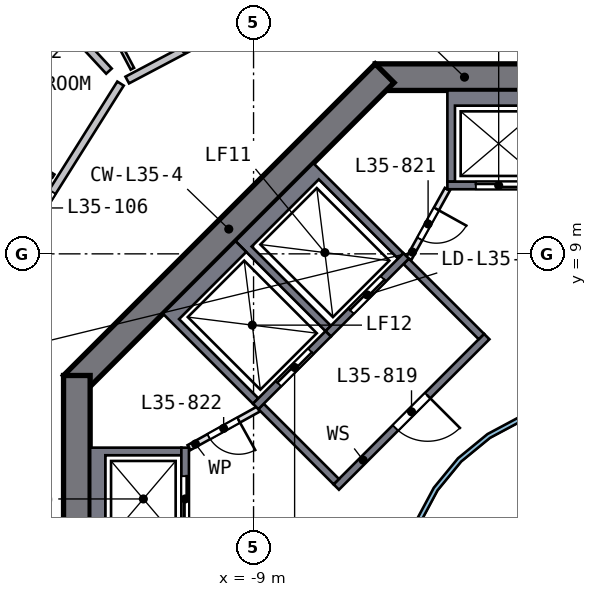
"""IFC4 building model, lengths in metres.
Left out: names, types, materials, properties, quantities, classifications, styles, units other than length and angle.
Written with IfcOpenShell. Run it as: python <this file> out.ifc"""

import sys

from ifc_helpers import new_model, si_unit, direction, frame, frame_2d, origin, place, context, subcontext, project, spatial, polyline, rectangle, outline, extrude, element, fill, save


model = new_model("IFC4")
c1 = context("Model", 3, precision=1e-05, world=origin(), true_north=direction((0.0, 1.0)))
c2 = subcontext(c1, "Body", "Model", "MODEL_VIEW")
j1 = project(units=[si_unit("LENGTHUNIT", "METRE"), si_unit("PLANEANGLEUNIT", "RADIAN")], contexts=[c1])
p1 = place(None, origin())
s1 = spatial("IfcSite", under=j1, at=p1, CompositionType="ELEMENT")
p2 = place(p1, origin())
s2 = spatial("IfcBuilding", under=s1, at=p2, CompositionType="ELEMENT")
p3 = place(p2, frame((0.0, 0.0, 147.0)))
s3 = spatial("IfcBuildingStorey", under=s2, at=p3, CompositionType="ELEMENT", Elevation=147.0)
p4 = place(p3, frame((5.799, 13.65, 0.0), z_axis=(0.0, 0.0, 1.0), x_axis=(-1.0, 0.0, 0.0)))
e1 = element("IfcWall", 1, at=p4, inside=s3, PredefinedType="SHEAR", context=c2, shape_type="SweptSolid", body=[
    extrude(rectangle(XDim=11.598, YDim=0.7, at=frame_2d((5.799, 0.0))), origin(), (0.0, 0.0, 1.0), 3.5),
])
p5 = place(p4, frame((4.899, 0.0, 0.0)))
e2 = element("IfcOpeningElement", 2, at=p5, cuts=e1, PredefinedType="OPENING", context=c2, shape_type="SweptSolid", body=[
    extrude(rectangle(XDim=1.8, YDim=2.1, at=frame_2d((0.9, 1.05))), frame((0.0, 0.36, 0.0), z_axis=(0.0, -1.0, 0.0), x_axis=(1.0, 0.0, 0.0)), (0.0, 0.0, 1.0), 0.72),
])
p6 = place(p3, frame((-5.552, 13.752, 0.0), z_axis=(0.0, 0.0, 1.0), x_axis=(-0.707106781, -0.707106781, 0.0)))
e3 = element("IfcWall", 3, at=p6, inside=s3, PredefinedType="SHEAR", context=c2, shape_type="SweptSolid", body=[
    extrude(rectangle(XDim=11.598, YDim=0.7, at=frame_2d((5.799, 0.0))), origin(), (0.0, 0.0, 1.0), 3.5),
])
p7 = place(p3, frame((-13.65, 5.799, 0.0), z_axis=(0.0, 0.0, 1.0), x_axis=(0.0, -1.0, 0.0)))
e4 = element("IfcWall", 4, at=p7, inside=s3, PredefinedType="SHEAR", context=c2, shape_type="SweptSolid", body=[
    extrude(rectangle(XDim=11.598, YDim=0.7, at=frame_2d((5.799, 0.0))), origin(), (0.0, 0.0, 1.0), 3.5),
])
p8 = place(p7, frame((4.899, 0.0, 0.0)))
e5 = element("IfcOpeningElement", 5, at=p8, cuts=e4, PredefinedType="OPENING", context=c2, shape_type="SweptSolid", body=[
    extrude(rectangle(XDim=1.8, YDim=2.1, at=frame_2d((0.9, 1.05))), frame((0.0, 0.36, 0.0), z_axis=(0.0, -1.0, 0.0), x_axis=(1.0, 0.0, 0.0)), (0.0, 0.0, 1.0), 0.72),
])
p9 = place(p3, origin())
e6 = element("IfcWall", 6, at=p9, inside=s3, PredefinedType="SOLIDWALL", context=c2, shape_type="SweptSolid", body=[
    extrude(outline(polyline([(-3.9, 10.9), (-3.9, 13.3), (-1.2, 13.3), (-1.2, 10.9), (-1.4, 10.9), (-1.4, 12.9), (-3.7, 12.9), (-3.7, 10.9), (-3.9, 10.9)])), origin(), (0.0, 0.0, 1.0), 3.19),
])
p10 = place(p3, frame((-1.2, 10.8, 0.0), z_axis=(0.0, 0.0, 1.0), x_axis=(-1.0, 0.0, 0.0)))
e7 = element("IfcWall", 7, at=p10, inside=s3, PredefinedType="SOLIDWALL", context=c2, shape_type="SweptSolid", body=[
    extrude(rectangle(XDim=2.7, YDim=0.2, at=frame_2d((1.35, 0.0))), origin(), (0.0, 0.0, 1.0), 3.19),
])
p11 = place(p10, frame((0.75, 0.0, 0.0)))
e8 = element("IfcOpeningElement", 8, at=p11, cuts=e7, PredefinedType="OPENING", context=c2, shape_type="SweptSolid", body=[
    extrude(rectangle(XDim=1.2, YDim=2.1, at=frame_2d((0.6, 1.05))), frame((0.0, 0.11, 0.0), z_axis=(0.0, -1.0, 0.0), x_axis=(1.0, 0.0, 0.0)), (0.0, 0.0, 1.0), 0.22),
])
p12 = place(p3, origin())
e9 = element("IfcWall", 9, at=p12, inside=s3, PredefinedType="SOLIDWALL", context=c2, shape_type="SweptSolid", body=[
    extrude(outline(polyline([(-13.3, 3.9), (-10.9, 3.9), (-10.9, 3.7), (-12.9, 3.7), (-12.9, 1.4), (-10.9, 1.4), (-10.9, 1.2), (-13.3, 1.2), (-13.3, 3.9)])), origin(), (0.0, 0.0, 1.0), 3.19),
])
p13 = place(p3, frame((-10.8, 1.2, 0.0), z_axis=(0.0, 0.0, 1.0), x_axis=(0.0, 1.0, 0.0)))
e10 = element("IfcWall", 10, at=p13, inside=s3, PredefinedType="SOLIDWALL", context=c2, shape_type="SweptSolid", body=[
    extrude(rectangle(XDim=2.7, YDim=0.2, at=frame_2d((1.35, 0.0))), origin(), (0.0, 0.0, 1.0), 3.19),
])
p14 = place(p13, frame((0.75, 0.0, 0.0)))
e11 = element("IfcOpeningElement", 11, at=p14, cuts=e10, PredefinedType="OPENING", context=c2, shape_type="SweptSolid", body=[
    extrude(rectangle(XDim=1.2, YDim=2.1, at=frame_2d((0.6, 1.05))), frame((0.0, 0.11, 0.0), z_axis=(0.0, -1.0, 0.0), x_axis=(1.0, 0.0, 0.0)), (0.0, 0.0, 1.0), 0.22),
])
p15 = place(p3, origin())
e12 = element("IfcWall", 12, at=p15, inside=s3, PredefinedType="SOLIDWALL", context=c2, shape_type="SweptSolid", body=[
    extrude(outline(polyline([(-9.475, 9.334), (-7.425, 11.385), (-5.056, 9.016), (-5.197, 8.874), (-7.283, 10.96), (-9.051, 9.192), (-6.965, 7.106), (-7.106, 6.965), (-9.475, 9.334)])), origin(), (0.0, 0.0, 1.0), 3.19),
])
p16 = place(p3, frame((-4.985, 8.945, 0.0), z_axis=(0.0, 0.0, 1.0), x_axis=(-0.707106781, -0.707106781, 0.0)))
e13 = element("IfcWall", 13, at=p16, inside=s3, PredefinedType="SOLIDWALL", context=c2, shape_type="SweptSolid", body=[
    extrude(rectangle(XDim=2.9, YDim=0.2, at=frame_2d((1.45, 0.0))), origin(), (0.0, 0.0, 1.0), 3.19),
])
p17 = place(p16, frame((0.85, 0.0, 0.0)))
e14 = element("IfcOpeningElement", 14, at=p17, cuts=e13, PredefinedType="OPENING", context=c2, shape_type="SweptSolid", body=[
    extrude(rectangle(XDim=1.2, YDim=2.1, at=frame_2d((0.6, 1.05))), frame((0.0, 0.11, 0.0), z_axis=(0.0, -1.0, 0.0), x_axis=(1.0, 0.0, 0.0)), (0.0, 0.0, 1.0), 0.22),
])
p18 = place(p3, origin())
e15 = element("IfcWall", 15, at=p18, inside=s3, PredefinedType="SOLIDWALL", context=c2, shape_type="SweptSolid", body=[
    extrude(outline(polyline([(-11.385, 7.425), (-9.475, 9.334), (-9.192, 9.051), (-10.96, 7.283), (-8.874, 5.197), (-9.016, 5.056), (-11.385, 7.425)])), origin(), (0.0, 0.0, 1.0), 3.19),
])
p19 = place(p3, frame((-7.036, 6.894, 0.0), z_axis=(0.0, 0.0, 1.0), x_axis=(-0.707106781, -0.707106781, 0.0)))
e16 = element("IfcWall", 16, at=p19, inside=s3, PredefinedType="SOLIDWALL", context=c2, shape_type="SweptSolid", body=[
    extrude(rectangle(XDim=2.7, YDim=0.2, at=frame_2d((1.35, 0.0))), origin(), (0.0, 0.0, 1.0), 3.19),
])
p20 = place(p19, frame((0.65, 0.0, 0.0)))
e17 = element("IfcOpeningElement", 17, at=p20, cuts=e16, PredefinedType="OPENING", context=c2, shape_type="SweptSolid", body=[
    extrude(rectangle(XDim=1.2, YDim=2.1, at=frame_2d((0.6, 1.05))), frame((0.0, 0.11, 0.0), z_axis=(0.0, -1.0, 0.0), x_axis=(1.0, 0.0, 0.0)), (0.0, 0.0, 1.0), 0.22),
])
p21 = place(p3, frame((-2.864, 6.823, 0.0), z_axis=(0.0, 0.0, 1.0), x_axis=(-0.707106781, -0.707106781, 0.0)))
e18 = element("IfcWall", 18, at=p21, inside=s3, PredefinedType="SOLIDWALL", context=c2, shape_type="SweptSolid", body=[
    extrude(rectangle(XDim=5.6, YDim=0.2, at=frame_2d((2.8, 0.0))), origin(), (0.0, 0.0, 1.0), 3.19),
])
p22 = place(p21, frame((2.2, 0.0, 0.0)))
e19 = element("IfcOpeningElement", 19, at=p22, cuts=e18, PredefinedType="OPENING", context=c2, shape_type="SweptSolid", body=[
    extrude(rectangle(XDim=1.2, YDim=2.1, at=frame_2d((0.6, 1.05))), frame((0.0, 0.11, 0.0), z_axis=(0.0, -1.0, 0.0), x_axis=(1.0, 0.0, 0.0)), (0.0, 0.0, 1.0), 0.22),
])
for number, where, z_axis, x_axis in (
    (20, (-3.005, 6.823, 0.0), (0.0, 0.0, 1.0), (-0.707, 0.707, 0.0)),
    (21, (-6.823, 3.005, 0.0), (0.0, 0.0, 1.0), (-0.707, 0.707, 0.0)),
):
    element("IfcWall", number, at=place(p3, frame(where, z_axis=z_axis, x_axis=x_axis)), inside=s3, PredefinedType="SOLIDWALL", context=c2, shape_type="SweptSolid", body=[
        extrude(rectangle(XDim=2.8, YDim=0.2, at=frame_2d((1.4, 0.0))), origin(), (0.0, 0.0, 1.0), 3.19),
    ])
p23 = place(p3, frame((-3.9, 10.7, 0.0), z_axis=(0.0, 0.0, 1.0), x_axis=(-0.485692555, -0.874129705, 0.0)))
e22 = element("IfcWall", 22, at=p23, inside=s3, PredefinedType="PARTITIONING", context=c2, shape_type="SweptSolid", body=[
    extrude(rectangle(XDim=2.089, YDim=0.15, at=frame_2d((1.044, 0.0))), origin(), (0.0, 0.0, 1.0), 3.19),
])
p24 = place(p23, frame((0.594, 0.0, 0.0)))
e23 = element("IfcOpeningElement", 23, at=p24, cuts=e22, PredefinedType="OPENING", context=c2, shape_type="SweptSolid", body=[
    extrude(rectangle(XDim=0.9, YDim=2.1, at=frame_2d((0.45, 1.05))), frame((0.0, 0.085, 0.0), z_axis=(0.0, -1.0, 0.0), x_axis=(1.0, 0.0, 0.0)), (0.0, 0.0, 1.0), 0.17),
])
p25 = place(p3, frame((-8.874, 4.914, 0.0), z_axis=(0.0, 0.0, 1.0), x_axis=(-0.874129705, -0.485692555, 0.0)))
e24 = element("IfcWall", 24, at=p25, inside=s3, PredefinedType="PARTITIONING", context=c2, shape_type="SweptSolid", body=[
    extrude(rectangle(XDim=2.089, YDim=0.15, at=frame_2d((1.044, 0.0))), origin(), (0.0, 0.0, 1.0), 3.19),
])
p26 = place(p25, frame((0.594, 0.0, 0.0)))
e25 = element("IfcOpeningElement", 25, at=p26, cuts=e24, PredefinedType="OPENING", context=c2, shape_type="SweptSolid", body=[
    extrude(rectangle(XDim=0.9, YDim=2.1, at=frame_2d((0.45, 1.05))), frame((0.0, 0.085, 0.0), z_axis=(0.0, -1.0, 0.0), x_axis=(1.0, 0.0, 0.0)), (0.0, 0.0, 1.0), 0.17),
])
p27 = place(p3, origin())
e26 = element("IfcWall", 26, at=p27, inside=s3, PredefinedType="SOLIDWALL", context=c2, shape_type="SweptSolid", body=[
    extrude(outline(polyline([(5.021, -0.999), (4.73, -1.959), (4.257, -2.844), (3.62, -3.62), (2.844, -4.257), (1.959, -4.73), (0.999, -5.021), (0.0, -5.12), (-0.999, -5.021), (-1.959, -4.73), (-2.844, -4.257), (-3.62, -3.62), (-4.257, -2.844), (-4.73, -1.959), (-5.021, -0.999), (-5.12, 0.0), (-5.021, 0.999), (-4.73, 1.959), (-4.257, 2.844), (-3.62, 3.62), (-2.844, 4.257), (-1.959, 4.73), (-0.999, 5.021), (0.0, 5.12), (0.999, 5.021), (1.959, 4.73), (2.844, 4.257), (3.62, 3.62), (4.257, 2.844), (4.73, 1.959), (5.021, 0.999), (5.12, 0.0), (5.021, -0.999)]), holes=[polyline([(4.904, 0.976), (4.619, 1.913), (4.157, 2.778), (3.535, 3.535), (2.778, 4.157), (1.913, 4.619), (0.976, 4.904), (0.0, 5.0), (-0.976, 4.904), (-1.913, 4.619), (-2.778, 4.157), (-3.535, 3.535), (-4.157, 2.778), (-4.619, 1.913), (-4.904, 0.976), (-5.0, 0.0), (-4.904, -0.976), (-4.619, -1.913), (-4.157, -2.778), (-3.535, -3.535), (-2.778, -4.157), (-1.913, -4.619), (-0.976, -4.904), (0.0, -5.0), (0.976, -4.904), (1.913, -4.619), (2.778, -4.157), (3.535, -3.535), (4.157, -2.778), (4.619, -1.913), (4.904, -0.976), (5.0, 0.0), (4.904, 0.976)])]), origin(), (0.0, 0.0, 1.0), 3.19),
])
p28 = place(p3, frame((-17.566, 5.425, 0.0), z_axis=(0.0, 0.0, 1.0), x_axis=(0.532300792, 0.846555294, 0.0)))
e27 = element("IfcWall", 27, at=p28, inside=s3, PredefinedType="SOLIDWALL", context=c2, shape_type="SweptSolid", body=[
    extrude(rectangle(XDim=9.516, YDim=0.2, at=frame_2d((4.758, 0.0))), origin(), (0.0, 0.0, 1.0), 3.19),
])
p29 = place(p28, frame((5.15, 0.0, 0.0)))
e28 = element("IfcOpeningElement", 28, at=p29, cuts=e27, PredefinedType="OPENING", context=c2, shape_type="SweptSolid", body=[
    extrude(rectangle(XDim=1.0, YDim=2.1, at=frame_2d((0.5, 1.05))), frame((0.0, 0.11, 0.0), z_axis=(0.0, -1.0, 0.0), x_axis=(1.0, 0.0, 0.0)), (0.0, 0.0, 1.0), 0.22),
])
p30 = place(p3, frame((-9.266, 15.189, 0.0), z_axis=(0.0, 0.0, 1.0), x_axis=(-0.884266542, -0.46698253, 0.0)))
e29 = element("IfcWall", 29, at=p30, inside=s3, PredefinedType="SOLIDWALL", context=c2, shape_type="SweptSolid", body=[
    extrude(rectangle(XDim=3.458, YDim=0.2, at=frame_2d((1.729, 0.0))), origin(), (0.0, 0.0, 1.0), 3.19),
])
p31 = place(p3, frame((-12.805, 13.809, 0.0), z_axis=(0.0, 0.0, 1.0), x_axis=(-0.679924039, 0.733282552, 0.0)))
e30 = element("IfcWall", 30, at=p31, inside=s3, PredefinedType="SOLIDWALL", context=c2, shape_type="SweptSolid", body=[
    extrude(rectangle(XDim=3.075, YDim=0.2, at=frame_2d((1.537, 0.0))), origin(), (0.0, 0.0, 1.0), 3.19),
])
p32 = place(p3, frame((-16.891, 12.698, 0.0), z_axis=(0.0, 0.0, 1.0), x_axis=(0.846583824, -0.532255417, 0.0)))
e31 = element("IfcWall", 31, at=p32, inside=s3, PredefinedType="PARTITIONING", context=c2, shape_type="SweptSolid", body=[
    extrude(rectangle(XDim=3.1, YDim=0.1, at=frame_2d((1.55, 0.0))), origin(), (0.0, 0.0, 1.0), 3.19),
])
p33 = place(p32, frame((1.15, 0.0, 0.0)))
e32 = element("IfcOpeningElement", 32, at=p33, cuts=e31, PredefinedType="OPENING", context=c2, shape_type="SweptSolid", body=[
    extrude(rectangle(XDim=0.9, YDim=2.1, at=frame_2d((0.45, 1.05))), frame((0.0, 0.06, 0.0), z_axis=(0.0, -1.0, 0.0), x_axis=(1.0, 0.0, 0.0)), (0.0, 0.0, 1.0), 0.12),
])
p34 = place(p3, frame((-12.189, 13.872, 0.0), z_axis=(0.0, 0.0, 1.0), x_axis=(-0.46699949, 0.884257585, 0.0)))
e33 = element("IfcWall", 33, at=p34, inside=s3, PredefinedType="PARTITIONING", context=c2, shape_type="SweptSolid", body=[
    extrude(rectangle(XDim=2.4, YDim=0.1, at=frame_2d((1.2, 0.0))), origin(), (0.0, 0.0, 1.0), 3.19),
])
p35 = place(p11, origin())
e34 = element("IfcDoor", 34, at=p35, inside=s3, OperationType="DOUBLE_DOOR_SLIDING", PredefinedType="DOOR", context=c2, shape_type="SweptSolid", body=[
    extrude(rectangle(XDim=1.2, YDim=2.1, at=frame_2d((0.6, 1.05))), frame((0.0, 0.025, 0.0), z_axis=(0.0, -1.0, 0.0), x_axis=(1.0, 0.0, 0.0)), (0.0, 0.0, 1.0), 0.05),
])
fill(e8, e34)
p36 = place(p14, origin())
e35 = element("IfcDoor", 35, at=p36, inside=s3, OperationType="DOUBLE_DOOR_SLIDING", PredefinedType="DOOR", context=c2, shape_type="SweptSolid", body=[
    extrude(rectangle(XDim=1.2, YDim=2.1, at=frame_2d((0.6, 1.05))), frame((0.0, 0.025, 0.0), z_axis=(0.0, -1.0, 0.0), x_axis=(1.0, 0.0, 0.0)), (0.0, 0.0, 1.0), 0.05),
])
fill(e11, e35)
p37 = place(p17, origin())
e36 = element("IfcDoor", 36, at=p37, inside=s3, OperationType="DOUBLE_DOOR_SLIDING", PredefinedType="DOOR", context=c2, shape_type="SweptSolid", body=[
    extrude(rectangle(XDim=1.2, YDim=2.1, at=frame_2d((0.6, 1.05))), frame((0.0, 0.025, 0.0), z_axis=(0.0, -1.0, 0.0), x_axis=(1.0, 0.0, 0.0)), (0.0, 0.0, 1.0), 0.05),
])
fill(e14, e36)
p38 = place(p20, origin())
e37 = element("IfcDoor", 37, at=p38, inside=s3, OperationType="DOUBLE_DOOR_SLIDING", PredefinedType="DOOR", context=c2, shape_type="SweptSolid", body=[
    extrude(rectangle(XDim=1.2, YDim=2.1, at=frame_2d((0.6, 1.05))), frame((0.0, 0.025, 0.0), z_axis=(0.0, -1.0, 0.0), x_axis=(1.0, 0.0, 0.0)), (0.0, 0.0, 1.0), 0.05),
])
fill(e17, e37)
p39 = place(p22, origin())
e38 = element("IfcDoor", 38, at=p39, inside=s3, OperationType="SINGLE_SWING_LEFT", PredefinedType="DOOR", context=c2, shape_type="SweptSolid", body=[
    extrude(rectangle(XDim=1.2, YDim=2.1, at=frame_2d((0.6, 1.05))), frame((0.0, 0.025, 0.0), z_axis=(0.0, -1.0, 0.0), x_axis=(1.0, 0.0, 0.0)), (0.0, 0.0, 1.0), 0.05),
])
fill(e19, e38)
p40 = place(p24, origin())
e39 = element("IfcDoor", 39, at=p40, inside=s3, OperationType="SINGLE_SWING_LEFT", PredefinedType="DOOR", context=c2, shape_type="SweptSolid", body=[
    extrude(rectangle(XDim=0.9, YDim=2.1, at=frame_2d((0.45, 1.05))), frame((0.0, 0.025, 0.0), z_axis=(0.0, -1.0, 0.0), x_axis=(1.0, 0.0, 0.0)), (0.0, 0.0, 1.0), 0.05),
])
fill(e23, e39)
p41 = place(p26, origin())
e40 = element("IfcDoor", 40, at=p41, inside=s3, OperationType="SINGLE_SWING_LEFT", PredefinedType="DOOR", context=c2, shape_type="SweptSolid", body=[
    extrude(rectangle(XDim=0.9, YDim=2.1, at=frame_2d((0.45, 1.05))), frame((0.0, 0.025, 0.0), z_axis=(0.0, -1.0, 0.0), x_axis=(1.0, 0.0, 0.0)), (0.0, 0.0, 1.0), 0.05),
])
fill(e25, e40)
p42 = place(p29, origin())
e41 = element("IfcDoor", 41, at=p42, inside=s3, OperationType="SINGLE_SWING_LEFT", PredefinedType="DOOR", context=c2, shape_type="SweptSolid", body=[
    extrude(rectangle(XDim=1.0, YDim=2.1, at=frame_2d((0.5, 1.05))), frame((0.0, 0.025, 0.0), z_axis=(0.0, -1.0, 0.0), x_axis=(1.0, 0.0, 0.0)), (0.0, 0.0, 1.0), 0.05),
])
fill(e28, e41)
save(model, sys.argv[1])
